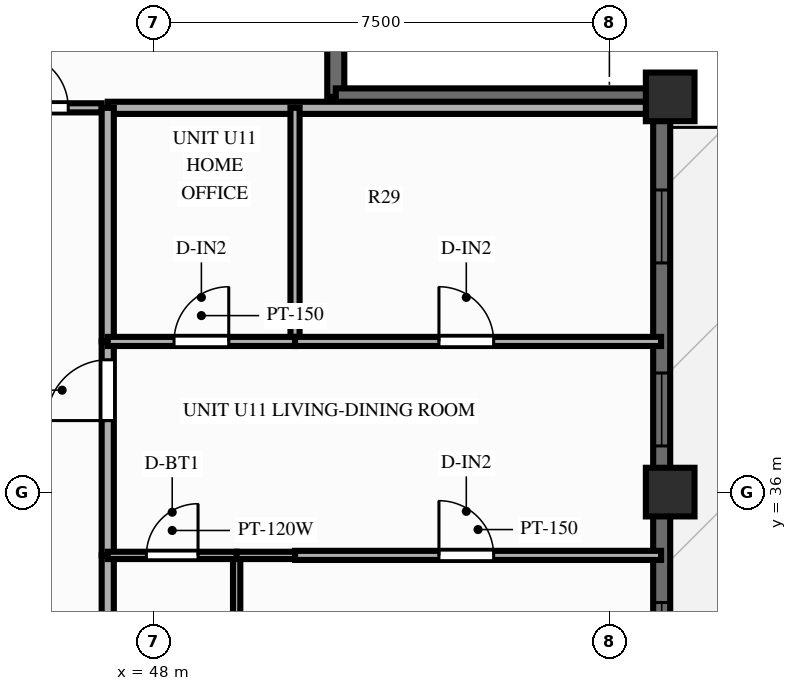
"""IFC4 building model, lengths in metres.
Left out: names, types, materials, properties, quantities, classifications, styles, units other than length and angle.
Written with IfcOpenShell. Run it as: python <this file> out.ifc"""

import sys

from ifc_helpers import new_model, si_unit, direction, frame, frame_2d, origin, origin_2d, place, context, subcontext, project, spatial, rectangle, extrude, source, transform, mapped, element, fill, save


model = new_model("IFC4")
c1 = context("Model", 3, precision=1e-05, world=origin(), true_north=direction((0.0, 1.0)))
c2 = subcontext(c1, "Body", "Model", "MODEL_VIEW")
j1 = project(units=[si_unit("LENGTHUNIT", "METRE"), si_unit("PLANEANGLEUNIT", "RADIAN")], contexts=[c1])
p1 = place(None, origin())
s1 = spatial("IfcSite", under=j1, at=p1, CompositionType="ELEMENT")
p2 = place(p1, origin())
s2 = spatial("IfcBuilding", under=s1, at=p2, CompositionType="ELEMENT")
p3 = place(p2, frame((0.0, 0.0, 199.6)))
s3 = spatial("IfcBuildingStorey", under=s2, at=p3, CompositionType="ELEMENT", Elevation=199.6)
m1 = source(origin(), c2, "Body", "SweptSolid", [
    extrude(rectangle(XDim=0.8, YDim=0.8, at=origin_2d()), origin(), (0.0, 0.0, 1.0), 3.0),
])
for number, where, z_axis, x_axis in (
    (1, (56.5, 36.0, 0.0), (0.0, 0.0, 1.0), (1.0, 0.0, 0.0)),
    (2, (56.5, 42.5, 0.0), (0.0, 0.0, 1.0), (1.0, 0.0, 0.0)),
):
    element("IfcColumn", number, at=place(p3, frame(where, z_axis=z_axis, x_axis=x_axis)), inside=s3, PredefinedType="COLUMN", context=c2, shape_type="MappedRepresentation", body=[
        mapped(m1, transform((0.0, 0.0, 0.0), scale=1.0)),
    ])
p4 = place(p3, frame((56.36, 11.5, 0.0), z_axis=(0.0, 0.0, 1.0), x_axis=(0.0, 1.0, 0.0)))
e3 = element("IfcWall", 3, at=p4, inside=s3, PredefinedType="SOLIDWALL", context=c2, shape_type="SweptSolid", body=[
    extrude(rectangle(XDim=31.0, YDim=0.28, at=frame_2d((15.5, 0.0))), origin(), (0.0, 0.0, 1.0), 2.28),
])
p5 = place(p4, frame((0.985, 0.0, 0.25)))
e4 = element("IfcOpeningElement", 4, at=p5, cuts=e3, PredefinedType="OPENING", context=c2, shape_type="SweptSolid", body=[
    extrude(rectangle(XDim=1.2, YDim=1.5, at=frame_2d((0.6, 0.75))), frame((0.0, 0.152, 0.0), z_axis=(0.0, -1.0, 0.0), x_axis=(1.0, 0.0, 0.0)), (0.0, 0.0, 1.0), 0.304),
])
p6 = place(p4, frame((3.995, 0.0, 0.25)))
e5 = element("IfcOpeningElement", 5, at=p6, cuts=e3, PredefinedType="OPENING", context=c2, shape_type="SweptSolid", body=[
    extrude(rectangle(XDim=1.2, YDim=1.5, at=frame_2d((0.6, 0.75))), frame((0.0, 0.152, 0.0), z_axis=(0.0, -1.0, 0.0), x_axis=(1.0, 0.0, 0.0)), (0.0, 0.0, 1.0), 0.304),
])
p7 = place(p4, frame((8.089, 0.0, 0.25)))
e6 = element("IfcOpeningElement", 6, at=p7, cuts=e3, PredefinedType="OPENING", context=c2, shape_type="SweptSolid", body=[
    extrude(rectangle(XDim=1.2, YDim=1.5, at=frame_2d((0.6, 0.75))), frame((0.0, 0.152, 0.0), z_axis=(0.0, -1.0, 0.0), x_axis=(1.0, 0.0, 0.0)), (0.0, 0.0, 1.0), 0.304),
])
p8 = place(p4, frame((11.373, 0.0, 0.25)))
e7 = element("IfcOpeningElement", 7, at=p8, cuts=e3, PredefinedType="OPENING", context=c2, shape_type="SweptSolid", body=[
    extrude(rectangle(XDim=1.2, YDim=1.5, at=frame_2d((0.6, 0.75))), frame((0.0, 0.152, 0.0), z_axis=(0.0, -1.0, 0.0), x_axis=(1.0, 0.0, 0.0)), (0.0, 0.0, 1.0), 0.304),
])
p9 = place(p4, frame((15.907, 0.0, 0.0), z_axis=(0.0, 0.0, 1.0), x_axis=(-1.0, 0.0, 0.0)))
e8 = element("IfcOpeningElement", 8, at=p9, cuts=e3, PredefinedType="OPENING", context=c2, shape_type="SweptSolid", body=[
    extrude(rectangle(XDim=1.6, YDim=2.15, at=frame_2d((0.8, 1.075))), frame((0.0, 0.152, 0.0), z_axis=(0.0, -1.0, 0.0), x_axis=(1.0, 0.0, 0.0)), (0.0, 0.0, 1.0), 0.304),
])
p10 = place(p4, frame((18.188, 0.0, 0.25)))
e9 = element("IfcOpeningElement", 9, at=p10, cuts=e3, PredefinedType="OPENING", context=c2, shape_type="SweptSolid", body=[
    extrude(rectangle(XDim=1.2, YDim=1.5, at=frame_2d((0.6, 0.75))), frame((0.0, 0.152, 0.0), z_axis=(0.0, -1.0, 0.0), x_axis=(1.0, 0.0, 0.0)), (0.0, 0.0, 1.0), 0.304),
])
p11 = place(p4, frame((21.484, 0.0, 0.25)))
e10 = element("IfcOpeningElement", 10, at=p11, cuts=e3, PredefinedType="OPENING", context=c2, shape_type="SweptSolid", body=[
    extrude(rectangle(XDim=1.2, YDim=1.5, at=frame_2d((0.6, 0.75))), frame((0.0, 0.152, 0.0), z_axis=(0.0, -1.0, 0.0), x_axis=(1.0, 0.0, 0.0)), (0.0, 0.0, 1.0), 0.304),
])
p12 = place(p4, frame((25.259, 0.0, 0.25)))
e11 = element("IfcOpeningElement", 11, at=p12, cuts=e3, PredefinedType="OPENING", context=c2, shape_type="SweptSolid", body=[
    extrude(rectangle(XDim=1.2, YDim=1.5, at=frame_2d((0.6, 0.75))), frame((0.0, 0.152, 0.0), z_axis=(0.0, -1.0, 0.0), x_axis=(1.0, 0.0, 0.0)), (0.0, 0.0, 1.0), 0.304),
])
p13 = place(p4, frame((28.269, 0.0, 0.25)))
e12 = element("IfcOpeningElement", 12, at=p13, cuts=e3, PredefinedType="OPENING", context=c2, shape_type="SweptSolid", body=[
    extrude(rectangle(XDim=1.2, YDim=1.5, at=frame_2d((0.6, 0.75))), frame((0.0, 0.152, 0.0), z_axis=(0.0, -1.0, 0.0), x_axis=(1.0, 0.0, 0.0)), (0.0, 0.0, 1.0), 0.304),
])
for number, where, z_axis, x_axis in (
    (13, (51.0, 42.5, 0.0), (0.0, 0.0, 1.0), (0.0, 1.0, 0.0)),
    (14, (51.0, 42.5, 0.0), (0.0, 0.0, 1.0), (1.0, 0.0, 0.0)),
):
    element("IfcWall", number, at=place(p3, frame(where, z_axis=z_axis, x_axis=x_axis)), inside=s3, PredefinedType="SOLIDWALL", context=c2, shape_type="SweptSolid", body=[
        extrude(rectangle(XDim=5.42, YDim=0.28, at=frame_2d((2.71, 0.0))), origin(), (0.0, 0.0, 1.0), 2.28),
    ])
p14 = place(p3, frame((44.82, 42.32, 0.0), z_axis=(0.0, 0.0, 1.0), x_axis=(1.0, 0.0, 0.0)))
e15 = element("IfcWall", 15, at=p14, inside=s3, PredefinedType="PARTITIONING", context=c2, shape_type="SweptSolid", body=[
    extrude(rectangle(XDim=2.33, YDim=0.15, at=frame_2d((1.165, 0.0))), origin(), (0.0, 0.0, 1.0), 2.79),
])
p15 = place(p14, frame((0.88, 0.0, 0.0)))
e16 = element("IfcOpeningElement", 16, at=p15, cuts=e15, PredefinedType="OPENING", context=c2, shape_type="SweptSolid", body=[
    extrude(rectangle(XDim=0.9, YDim=2.1, at=frame_2d((0.45, 1.05))), frame((0.0, 0.087, 0.0), z_axis=(0.0, -1.0, 0.0), x_axis=(1.0, 0.0, 0.0)), (0.0, 0.0, 1.0), 0.174),
])
p16 = place(p3, frame((47.25, 42.32, 0.0), z_axis=(0.0, 0.0, 1.0), x_axis=(1.0, 0.0, 0.0)))
e17 = element("IfcWall", 17, at=p16, inside=s3, PredefinedType="PARTITIONING", context=c2, shape_type="SweptSolid", body=[
    extrude(rectangle(XDim=9.1, YDim=0.2, at=frame_2d((4.55, 0.0))), origin(), (0.0, 0.0, 1.0), 2.79),
])
p17 = place(p3, frame((47.25, 32.209, 0.0), z_axis=(0.0, 0.0, 1.0), x_axis=(0.0, 1.0, 0.0)))
e18 = element("IfcWall", 18, at=p17, inside=s3, PredefinedType="PARTITIONING", context=c2, shape_type="SweptSolid", body=[
    extrude(rectangle(XDim=2.75, YDim=0.2, at=frame_2d((1.375, 0.0))), origin(), (0.0, 0.0, 1.0), 2.79),
])
p18 = place(p3, frame((47.25, 34.959, 0.0), z_axis=(0.0, 0.0, 1.0), x_axis=(0.0, 1.0, 0.0)))
e19 = element("IfcWall", 19, at=p18, inside=s3, PredefinedType="PARTITIONING", context=c2, shape_type="SweptSolid", body=[
    extrude(rectangle(XDim=3.519, YDim=0.2, at=frame_2d((1.76, 0.0))), origin(), (0.0, 0.0, 1.0), 2.79),
])
p19 = place(p18, frame((2.217, 0.0, 0.0)))
e20 = element("IfcOpeningElement", 20, at=p19, cuts=e19, PredefinedType="OPENING", context=c2, shape_type="SweptSolid", body=[
    extrude(rectangle(XDim=1.0, YDim=2.15, at=frame_2d((0.5, 1.075))), frame((0.0, 0.112, 0.0), z_axis=(0.0, -1.0, 0.0), x_axis=(1.0, 0.0, 0.0)), (0.0, 0.0, 1.0), 0.224),
])
p20 = place(p3, frame((47.25, 38.478, 0.0), z_axis=(0.0, 0.0, 1.0), x_axis=(0.0, 1.0, 0.0)))
e21 = element("IfcWall", 21, at=p20, inside=s3, PredefinedType="PARTITIONING", context=c2, shape_type="SweptSolid", body=[
    extrude(rectangle(XDim=3.842, YDim=0.2, at=frame_2d((1.921, 0.0))), origin(), (0.0, 0.0, 1.0), 2.79),
])
p21 = place(p3, frame((49.37, 32.209, 0.0), z_axis=(0.0, 0.0, 1.0), x_axis=(0.0, 1.0, 0.0)))
e22 = element("IfcWall", 22, at=p21, inside=s3, PredefinedType="PARTITIONING", context=c2, shape_type="SweptSolid", body=[
    extrude(rectangle(XDim=2.75, YDim=0.12, at=frame_2d((1.375, 0.0))), origin(), (0.0, 0.0, 1.0), 2.79),
])
p22 = place(p3, frame((50.33, 38.478, 0.0), z_axis=(0.0, 0.0, 1.0), x_axis=(0.0, 1.0, 0.0)))
e23 = element("IfcWall", 23, at=p22, inside=s3, PredefinedType="PARTITIONING", context=c2, shape_type="SweptSolid", body=[
    extrude(rectangle(XDim=3.842, YDim=0.15, at=frame_2d((1.921, 0.0))), origin(), (0.0, 0.0, 1.0), 2.79),
])
p23 = place(p3, frame((47.25, 34.959, 0.0), z_axis=(0.0, 0.0, 1.0), x_axis=(1.0, 0.0, 0.0)))
e24 = element("IfcWall", 24, at=p23, inside=s3, PredefinedType="PARTITIONING", context=c2, shape_type="SweptSolid", body=[
    extrude(rectangle(XDim=2.12, YDim=0.12, at=frame_2d((1.06, 0.0))), origin(), (0.0, 0.0, 1.0), 2.79),
])
p24 = place(p23, frame((0.635, 0.0, 0.0)))
e25 = element("IfcOpeningElement", 25, at=p24, cuts=e24, PredefinedType="OPENING", context=c2, shape_type="SweptSolid", body=[
    extrude(rectangle(XDim=0.85, YDim=2.05, at=frame_2d((0.425, 1.025))), frame((0.0, 0.072, 0.0), z_axis=(0.0, -1.0, 0.0), x_axis=(1.0, 0.0, 0.0)), (0.0, 0.0, 1.0), 0.144),
])
p25 = place(p3, frame((49.37, 34.959, 0.0), z_axis=(0.0, 0.0, 1.0), x_axis=(1.0, 0.0, 0.0)))
e26 = element("IfcWall", 26, at=p25, inside=s3, PredefinedType="PARTITIONING", context=c2, shape_type="SweptSolid", body=[
    extrude(rectangle(XDim=0.96, YDim=0.12, at=frame_2d((0.48, 0.0))), origin(), (0.0, 0.0, 1.0), 2.79),
])
p26 = place(p3, frame((50.33, 34.959, 0.0), z_axis=(0.0, 0.0, 1.0), x_axis=(1.0, 0.0, 0.0)))
e27 = element("IfcWall", 27, at=p26, inside=s3, PredefinedType="PARTITIONING", context=c2, shape_type="SweptSolid", body=[
    extrude(rectangle(XDim=6.02, YDim=0.15, at=frame_2d((3.01, 0.0))), origin(), (0.0, 0.0, 1.0), 2.79),
])
p27 = place(p26, frame((2.367, 0.0, 0.0)))
e28 = element("IfcOpeningElement", 28, at=p27, cuts=e27, PredefinedType="OPENING", context=c2, shape_type="SweptSolid", body=[
    extrude(rectangle(XDim=0.9, YDim=2.1, at=frame_2d((0.45, 1.05))), frame((0.0, 0.087, 0.0), z_axis=(0.0, -1.0, 0.0), x_axis=(1.0, 0.0, 0.0)), (0.0, 0.0, 1.0), 0.174),
])
p28 = place(p3, frame((47.25, 38.478, 0.0), z_axis=(0.0, 0.0, 1.0), x_axis=(1.0, 0.0, 0.0)))
e29 = element("IfcWall", 29, at=p28, inside=s3, PredefinedType="PARTITIONING", context=c2, shape_type="SweptSolid", body=[
    extrude(rectangle(XDim=3.08, YDim=0.15, at=frame_2d((1.54, 0.0))), origin(), (0.0, 0.0, 1.0), 2.79),
])
p29 = place(p28, frame((1.09, 0.0, 0.0)))
e30 = element("IfcOpeningElement", 30, at=p29, cuts=e29, PredefinedType="OPENING", context=c2, shape_type="SweptSolid", body=[
    extrude(rectangle(XDim=0.9, YDim=2.1, at=frame_2d((0.45, 1.05))), frame((0.0, 0.087, 0.0), z_axis=(0.0, -1.0, 0.0), x_axis=(1.0, 0.0, 0.0)), (0.0, 0.0, 1.0), 0.174),
])
p30 = place(p3, frame((50.33, 38.478, 0.0), z_axis=(0.0, 0.0, 1.0), x_axis=(1.0, 0.0, 0.0)))
e31 = element("IfcWall", 31, at=p30, inside=s3, PredefinedType="PARTITIONING", context=c2, shape_type="SweptSolid", body=[
    extrude(rectangle(XDim=6.02, YDim=0.15, at=frame_2d((3.01, 0.0))), origin(), (0.0, 0.0, 1.0), 2.79),
])
p31 = place(p30, frame((2.367, 0.0, 0.0)))
e32 = element("IfcOpeningElement", 32, at=p31, cuts=e31, PredefinedType="OPENING", context=c2, shape_type="SweptSolid", body=[
    extrude(rectangle(XDim=0.9, YDim=2.1, at=frame_2d((0.45, 1.05))), frame((0.0, 0.087, 0.0), z_axis=(0.0, -1.0, 0.0), x_axis=(1.0, 0.0, 0.0)), (0.0, 0.0, 1.0), 0.174),
])
m2 = source(origin(), c2, "Body", "SweptSolid", [
    extrude(rectangle(XDim=1.2, YDim=1.5, at=frame_2d((0.6, 0.75))), frame((0.0, 0.03, 0.0), z_axis=(0.0, -1.0, 0.0), x_axis=(1.0, 0.0, 0.0)), (0.0, 0.0, 1.0), 0.06),
])
p32 = place(p11, origin())
e33 = element("IfcWindow", 33, at=p32, inside=s3, PartitioningType="SINGLE_PANEL", PredefinedType="WINDOW", context=c2, shape_type="MappedRepresentation", body=[
    mapped(m2, transform((0.0, 0.0, 0.0), scale=1.0)),
])
fill(e10, e33)
p33 = place(p12, origin())
e34 = element("IfcWindow", 34, at=p33, inside=s3, PartitioningType="SINGLE_PANEL", PredefinedType="WINDOW", context=c2, shape_type="MappedRepresentation", body=[
    mapped(m2, transform((0.0, 0.0, 0.0), scale=1.0)),
])
fill(e11, e34)
p34 = place(p13, origin())
e35 = element("IfcWindow", 35, at=p34, inside=s3, PartitioningType="SINGLE_PANEL", PredefinedType="WINDOW", context=c2, shape_type="MappedRepresentation", body=[
    mapped(m2, transform((0.0, 0.0, 0.0), scale=1.0)),
])
fill(e12, e35)
m3 = source(origin(), c2, "Body", "SweptSolid", [
    extrude(rectangle(XDim=0.9, YDim=2.1, at=frame_2d((0.45, 1.05))), frame((0.0, 0.025, 0.0), z_axis=(0.0, -1.0, 0.0), x_axis=(1.0, 0.0, 0.0)), (0.0, 0.0, 1.0), 0.05),
])
p35 = place(p15, origin())
e36 = element("IfcDoor", 36, at=p35, inside=s3, OperationType="SINGLE_SWING_LEFT", PredefinedType="DOOR", context=c2, shape_type="MappedRepresentation", body=[
    mapped(m3, transform((0.0, 0.0, 0.0), scale=1.0)),
])
fill(e16, e36)
m4 = source(origin(), c2, "Body", "SweptSolid", [
    extrude(rectangle(XDim=1.0, YDim=2.15, at=frame_2d((0.5, 1.075))), frame((0.0, 0.025, 0.0), z_axis=(0.0, -1.0, 0.0), x_axis=(1.0, 0.0, 0.0)), (0.0, 0.0, 1.0), 0.05),
])
p36 = place(p19, origin())
e37 = element("IfcDoor", 37, at=p36, inside=s3, OperationType="SINGLE_SWING_LEFT", PredefinedType="DOOR", context=c2, shape_type="MappedRepresentation", body=[
    mapped(m4, transform((0.0, 0.0, 0.0), scale=1.0)),
])
fill(e20, e37)
m5 = source(origin(), c2, "Body", "SweptSolid", [
    extrude(rectangle(XDim=0.85, YDim=2.05, at=frame_2d((0.425, 1.025))), frame((0.0, 0.025, 0.0), z_axis=(0.0, -1.0, 0.0), x_axis=(1.0, 0.0, 0.0)), (0.0, 0.0, 1.0), 0.05),
])
p37 = place(p24, origin())
e38 = element("IfcDoor", 38, at=p37, inside=s3, OperationType="SINGLE_SWING_RIGHT", PredefinedType="DOOR", context=c2, shape_type="MappedRepresentation", body=[
    mapped(m5, transform((0.0, 0.0, 0.0), scale=1.0)),
])
fill(e25, e38)
p38 = place(p27, origin())
e39 = element("IfcDoor", 39, at=p38, inside=s3, OperationType="SINGLE_SWING_LEFT", PredefinedType="DOOR", context=c2, shape_type="MappedRepresentation", body=[
    mapped(m3, transform((0.0, 0.0, 0.0), scale=1.0)),
])
fill(e28, e39)
p39 = place(p29, origin())
e40 = element("IfcDoor", 40, at=p39, inside=s3, OperationType="SINGLE_SWING_RIGHT", PredefinedType="DOOR", context=c2, shape_type="MappedRepresentation", body=[
    mapped(m3, transform((0.0, 0.0, 0.0), scale=1.0)),
])
fill(e30, e40)
p40 = place(p31, origin())
e41 = element("IfcDoor", 41, at=p40, inside=s3, OperationType="SINGLE_SWING_LEFT", PredefinedType="DOOR", context=c2, shape_type="MappedRepresentation", body=[
    mapped(m3, transform((0.0, 0.0, 0.0), scale=1.0)),
])
fill(e32, e41)
save(model, sys.argv[1])
